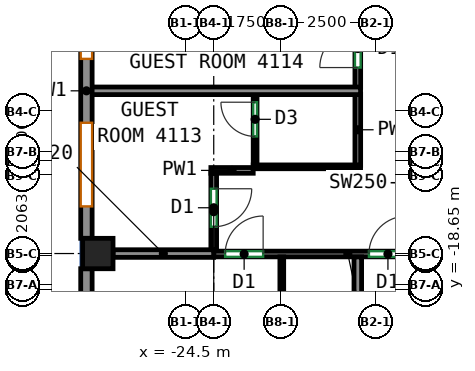
"""IFC4 building model, lengths in metres.
Left out: names, types, materials, properties, quantities, classifications, styles, units other than length and angle.
Written with IfcOpenShell. Run it as: python <this file> out.ifc"""

import sys

from ifc_helpers import new_model, si_unit, direction, frame, frame_2d, origin, origin_2d, place, context, subcontext, project, spatial, rectangle, extrude, source, transform, mapped, element, fill, save


model = new_model("IFC4")
c1 = context("Model", 3, precision=1e-05, world=origin(), true_north=direction((0.0, 1.0)))
c2 = subcontext(c1, "Body", "Model", "MODEL_VIEW")
j1 = project(units=[si_unit("LENGTHUNIT", "METRE"), si_unit("PLANEANGLEUNIT", "RADIAN")], contexts=[c1])
p1 = place(None, origin())
s1 = spatial("IfcSite", under=j1, at=p1, CompositionType="ELEMENT")
p2 = place(p1, origin())
s2 = spatial("IfcBuilding", under=s1, at=p2, CompositionType="ELEMENT")
p3 = place(p2, frame((0.0, 0.0, 175.3)))
s3 = spatial("IfcBuildingStorey", under=s2, at=p3, CompositionType="ELEMENT", Elevation=175.3)
m1 = source(origin(), c2, "Body", "SweptSolid", [
    extrude(rectangle(XDim=0.8, YDim=0.8, at=origin_2d()), origin(), (0.0, 0.0, 1.0), 3.12),
])
p4 = place(p3, frame((-26.8, -17.688, 0.0), z_axis=(0.0, 0.0, 1.0), x_axis=(1.0, 0.0, 0.0)))
e1 = element("IfcColumn", 1, at=p4, inside=s3, PredefinedType="COLUMN", context=c2, shape_type="MappedRepresentation", body=[
    mapped(m1, transform((0.0, 0.0, 0.0))),
])
m2 = source(origin(), c2, "Body", "SweptSolid", [
    extrude(rectangle(XDim=7.763, YDim=0.3, at=frame_2d((3.881, 0.0))), origin(), (0.0, 0.0, 1.0), 3.12),
])
p5 = place(p3, frame((-27.1, -9.525, 0.0), z_axis=(0.0, 0.0, 1.0), x_axis=(0.0, -1.0, 0.0)))
e2 = element("IfcWall", 2, at=p5, inside=s3, PredefinedType="SOLIDWALL", context=c2, shape_type="MappedRepresentation", body=[
    mapped(m2, transform((0.0, 0.0, 0.0))),
])
p6 = place(p5, frame((0.841, 0.0, 0.85)))
e3 = element("IfcOpeningElement", 3, at=p6, cuts=e2, PredefinedType="OPENING", context=c2, shape_type="SweptSolid", body=[
    extrude(rectangle(XDim=2.2, YDim=1.95, at=frame_2d((1.1, 0.975))), frame((0.0, 0.16, 0.0), z_axis=(0.0, -1.0, 0.0), x_axis=(1.0, 0.0, 0.0)), (0.0, 0.0, 1.0), 0.32),
])
p7 = place(p5, frame((4.722, 0.0, 0.85)))
e4 = element("IfcOpeningElement", 4, at=p7, cuts=e2, PredefinedType="OPENING", context=c2, shape_type="SweptSolid", body=[
    extrude(rectangle(XDim=2.2, YDim=1.95, at=frame_2d((1.1, 0.975))), frame((0.0, 0.16, 0.0), z_axis=(0.0, -1.0, 0.0), x_axis=(1.0, 0.0, 0.0)), (0.0, 0.0, 1.0), 0.32),
])
m3 = source(origin(), c2, "Body", "SweptSolid", [
    extrude(rectangle(XDim=4.263, YDim=0.3, at=frame_2d((2.131, 0.0))), origin(), (0.0, 0.0, 1.0), 3.12),
])
p8 = place(p3, frame((-27.1, -18.087, 0.0), z_axis=(0.0, 0.0, 1.0), x_axis=(0.0, -1.0, 0.0)))
e5 = element("IfcWall", 5, at=p8, inside=s3, PredefinedType="SOLIDWALL", context=c2, shape_type="MappedRepresentation", body=[
    mapped(m3, transform((0.0, 0.0, 0.0))),
])
p9 = place(p8, frame((1.031, 0.0, 0.85)))
e6 = element("IfcOpeningElement", 6, at=p9, cuts=e5, PredefinedType="OPENING", context=c2, shape_type="SweptSolid", body=[
    extrude(rectangle(XDim=2.2, YDim=1.95, at=frame_2d((1.1, 0.975))), frame((0.0, 0.16, 0.0), z_axis=(0.0, -1.0, 0.0), x_axis=(1.0, 0.0, 0.0)), (0.0, 0.0, 1.0), 0.32),
])
p10 = place(p3, frame((-23.75, -17.7, 0.0), z_axis=(0.0, 0.0, 1.0), x_axis=(1.0, 0.0, 0.0)))
e7 = element("IfcWall", 7, at=p10, inside=s3, PredefinedType="PARTITIONING", context=c2, shape_type="SweptSolid", body=[
    extrude(rectangle(XDim=7.058, YDim=0.15, at=frame_2d((3.529, 0.0))), origin(), (0.0, 0.0, 1.0), 2.52),
])
p11 = place(p10, frame((0.3, 0.0, 0.0)))
e8 = element("IfcOpeningElement", 8, at=p11, cuts=e7, PredefinedType="OPENING", context=c2, shape_type="SweptSolid", body=[
    extrude(rectangle(XDim=1.0, YDim=2.1, at=frame_2d((0.5, 1.05))), frame((0.0, 0.085, 0.0), z_axis=(0.0, -1.0, 0.0), x_axis=(1.0, 0.0, 0.0)), (0.0, 0.0, 1.0), 0.17),
])
p12 = place(p10, frame((4.084, 0.0, 0.0)))
e9 = element("IfcOpeningElement", 9, at=p12, cuts=e7, PredefinedType="OPENING", context=c2, shape_type="SweptSolid", body=[
    extrude(rectangle(XDim=1.0, YDim=2.1, at=frame_2d((0.5, 1.05))), frame((0.0, 0.085, 0.0), z_axis=(0.0, -1.0, 0.0), x_axis=(1.0, 0.0, 0.0)), (0.0, 0.0, 1.0), 0.17),
])
p13 = place(p3, frame((-23.75, -15.575, 0.0), z_axis=(0.0, 0.0, 1.0), x_axis=(0.0, -1.0, 0.0)))
e10 = element("IfcWall", 10, at=p13, inside=s3, PredefinedType="PARTITIONING", context=c2, shape_type="SweptSolid", body=[
    extrude(rectangle(XDim=2.023, YDim=0.15, at=frame_2d((1.011, 0.0))), origin(), (0.0, 0.0, 1.0), 2.52),
])
p14 = place(p13, frame((0.408, 0.0, 0.0)))
e11 = element("IfcOpeningElement", 11, at=p14, cuts=e10, PredefinedType="OPENING", context=c2, shape_type="SweptSolid", body=[
    extrude(rectangle(XDim=1.0, YDim=2.1, at=frame_2d((0.5, 1.05))), frame((0.0, 0.085, 0.0), z_axis=(0.0, -1.0, 0.0), x_axis=(1.0, 0.0, 0.0)), (0.0, 0.0, 1.0), 0.17),
])
p15 = place(p3, frame((-23.825, -15.5, 0.0), z_axis=(0.0, 0.0, 1.0), x_axis=(1.0, 0.0, 0.0)))
e12 = element("IfcWall", 12, at=p15, inside=s3, PredefinedType="PARTITIONING", context=c2, shape_type="SweptSolid", body=[
    extrude(rectangle(XDim=1.114, YDim=0.15, at=frame_2d((0.557, 0.0))), origin(), (0.0, 0.0, 1.0), 3.12),
])
p16 = place(p3, frame((-19.959, -15.366, 0.0), z_axis=(0.0, 0.0, 1.0), x_axis=(0.0, 1.0, 0.0)))
e13 = element("IfcWall", 13, at=p16, inside=s3, PredefinedType="PARTITIONING", context=c2, shape_type="SweptSolid", body=[
    extrude(rectangle(XDim=1.87, YDim=0.15, at=frame_2d((0.935, 0.0))), origin(), (0.0, 0.0, 1.0), 3.12),
])
p17 = place(p3, frame((-19.959, -13.316, 0.0), z_axis=(0.0, 0.0, 1.0), x_axis=(0.0, 1.0, 0.0)))
e14 = element("IfcWall", 14, at=p17, inside=s3, PredefinedType="PARTITIONING", context=c2, shape_type="SweptSolid", body=[
    extrude(rectangle(XDim=2.151, YDim=0.15, at=frame_2d((1.075, 0.0))), origin(), (0.0, 0.0, 1.0), 3.12),
])
p18 = place(p17, frame((0.522, 0.0, 0.0)))
e15 = element("IfcOpeningElement", 15, at=p18, cuts=e14, PredefinedType="OPENING", context=c2, shape_type="SweptSolid", body=[
    extrude(rectangle(XDim=1.0, YDim=2.1, at=frame_2d((0.5, 1.05))), frame((0.0, 0.085, 0.0), z_axis=(0.0, -1.0, 0.0), x_axis=(1.0, 0.0, 0.0)), (0.0, 0.0, 1.0), 0.17),
])
p19 = place(p3, frame((-21.959, -20.338, 0.0), z_axis=(0.0, 0.0, 1.0), x_axis=(0.0, 1.0, 0.0)))
e16 = element("IfcWall", 16, at=p19, inside=s3, PredefinedType="PARTITIONING", context=c2, shape_type="SweptSolid", body=[
    extrude(rectangle(XDim=2.561, YDim=0.1, at=frame_2d((1.28, 0.0))), origin(), (0.0, 0.0, 1.0), 3.12),
])
p20 = place(p19, frame((0.41, 0.0, 0.0)))
e17 = element("IfcOpeningElement", 17, at=p20, cuts=e16, PredefinedType="OPENING", context=c2, shape_type="SweptSolid", body=[
    extrude(rectangle(XDim=0.9, YDim=2.1, at=frame_2d((0.45, 1.05))), frame((0.0, 0.06, 0.0), z_axis=(0.0, -1.0, 0.0), x_axis=(1.0, 0.0, 0.0)), (0.0, 0.0, 1.0), 0.12),
])
p21 = place(p3, frame((-26.4, -17.688, 0.0), z_axis=(0.0, 0.0, 1.0), x_axis=(1.0, 0.0, 0.0)))
e18 = element("IfcWall", 18, at=p21, inside=s3, PredefinedType="PARTITIONING", context=c2, shape_type="SweptSolid", body=[
    extrude(rectangle(XDim=2.648, YDim=0.2, at=frame_2d((1.324, 0.0))), origin(), (0.0, 0.0, 1.0), 2.52),
])
p22 = place(p3, frame((-19.959, -20.338, 0.0), z_axis=(0.0, 0.0, 1.0), x_axis=(0.0, 1.0, 0.0)))
e19 = element("IfcWall", 19, at=p22, inside=s3, PredefinedType="PARTITIONING", context=c2, shape_type="SweptSolid", body=[
    extrude(rectangle(XDim=2.561, YDim=0.2, at=frame_2d((1.28, 0.0))), origin(), (0.0, 0.0, 1.0), 3.12),
])
p23 = place(p3, frame((-19.886, -15.406, 0.0), z_axis=(0.0, 0.0, 1.0), x_axis=(-1.0, 0.0, 0.0)))
e20 = element("IfcWall", 20, at=p23, inside=s3, PredefinedType="PARTITIONING", context=c2, shape_type="SweptSolid", body=[
    extrude(rectangle(XDim=2.825, YDim=0.1, at=frame_2d((1.413, 0.0))), origin(), (0.0, 0.0, 1.0), 3.12),
])
p24 = place(p3, frame((-22.661, -15.356, 0.0), z_axis=(0.0, 0.0, 1.0), x_axis=(0.0, 1.0, 0.0)))
e21 = element("IfcWall", 21, at=p24, inside=s3, PredefinedType="PARTITIONING", context=c2, shape_type="SweptSolid", body=[
    extrude(rectangle(XDim=1.85, YDim=0.1, at=frame_2d((0.925, 0.0))), origin(), (0.0, 0.0, 1.0), 3.12),
])
p25 = place(p24, frame((0.75, 0.0, 0.0)))
e22 = element("IfcOpeningElement", 22, at=p25, cuts=e21, PredefinedType="OPENING", context=c2, shape_type="SweptSolid", body=[
    extrude(rectangle(XDim=0.9, YDim=2.1, at=frame_2d((0.45, 1.05))), frame((0.0, 0.06, 0.0), z_axis=(0.0, -1.0, 0.0), x_axis=(1.0, 0.0, 0.0)), (0.0, 0.0, 1.0), 0.12),
])
p26 = place(p3, frame((-27.0, -13.406, 0.0), z_axis=(0.0, 0.0, 1.0), x_axis=(1.0, 0.0, 0.0)))
e23 = element("IfcWall", 23, at=p26, inside=s3, PredefinedType="PARTITIONING", context=c2, shape_type="SweptSolid", body=[
    extrude(rectangle(XDim=7.114, YDim=0.2, at=frame_2d((3.557, 0.0))), origin(), (0.0, 0.0, 1.0), 3.12),
])
p27 = place(p6, origin())
e24 = element("IfcWindow", 24, at=p27, inside=s3, PartitioningType="SINGLE_PANEL", PredefinedType="WINDOW", context=c2, shape_type="SweptSolid", body=[
    extrude(rectangle(XDim=2.2, YDim=1.95, at=frame_2d((1.1, 0.975))), frame((0.0, 0.03, 0.0), z_axis=(0.0, -1.0, 0.0), x_axis=(1.0, 0.0, 0.0)), (0.0, 0.0, 1.0), 0.06),
])
fill(e3, e24)
p28 = place(p7, origin())
e25 = element("IfcWindow", 25, at=p28, inside=s3, PartitioningType="SINGLE_PANEL", PredefinedType="WINDOW", context=c2, shape_type="SweptSolid", body=[
    extrude(rectangle(XDim=2.2, YDim=1.95, at=frame_2d((1.1, 0.975))), frame((0.0, 0.03, 0.0), z_axis=(0.0, -1.0, 0.0), x_axis=(1.0, 0.0, 0.0)), (0.0, 0.0, 1.0), 0.06),
])
fill(e4, e25)
p29 = place(p11, origin())
e26 = element("IfcDoor", 26, at=p29, inside=s3, OperationType="SINGLE_SWING_RIGHT", PredefinedType="DOOR", context=c2, shape_type="SweptSolid", body=[
    extrude(rectangle(XDim=1.0, YDim=2.1, at=frame_2d((0.5, 1.05))), frame((0.0, 0.025, 0.0), z_axis=(0.0, -1.0, 0.0), x_axis=(1.0, 0.0, 0.0)), (0.0, 0.0, 1.0), 0.05),
])
fill(e8, e26)
p30 = place(p12, origin())
e27 = element("IfcDoor", 27, at=p30, inside=s3, OperationType="SINGLE_SWING_RIGHT", PredefinedType="DOOR", context=c2, shape_type="SweptSolid", body=[
    extrude(rectangle(XDim=1.0, YDim=2.1, at=frame_2d((0.5, 1.05))), frame((0.0, 0.025, 0.0), z_axis=(0.0, -1.0, 0.0), x_axis=(1.0, 0.0, 0.0)), (0.0, 0.0, 1.0), 0.05),
])
fill(e9, e27)
p31 = place(p14, origin())
e28 = element("IfcDoor", 28, at=p31, inside=s3, OperationType="SINGLE_SWING_LEFT", PredefinedType="DOOR", context=c2, shape_type="SweptSolid", body=[
    extrude(rectangle(XDim=1.0, YDim=2.1, at=frame_2d((0.5, 1.05))), frame((0.0, 0.025, 0.0), z_axis=(0.0, -1.0, 0.0), x_axis=(1.0, 0.0, 0.0)), (0.0, 0.0, 1.0), 0.05),
])
fill(e11, e28)
p32 = place(p25, origin())
e29 = element("IfcDoor", 29, at=p32, inside=s3, OperationType="SINGLE_SWING_RIGHT", PredefinedType="DOOR", context=c2, shape_type="SweptSolid", body=[
    extrude(rectangle(XDim=0.9, YDim=2.1, at=frame_2d((0.45, 1.05))), frame((0.0, 0.025, 0.0), z_axis=(0.0, -1.0, 0.0), x_axis=(1.0, 0.0, 0.0)), (0.0, 0.0, 1.0), 0.05),
])
fill(e22, e29)
p33 = place(p18, origin())
e30 = element("IfcDoor", 30, at=p33, inside=s3, OperationType="SINGLE_SWING_LEFT", PredefinedType="DOOR", context=c2, shape_type="SweptSolid", body=[
    extrude(rectangle(XDim=1.0, YDim=2.1, at=frame_2d((0.5, 1.05))), frame((0.0, 0.025, 0.0), z_axis=(0.0, -1.0, 0.0), x_axis=(1.0, 0.0, 0.0)), (0.0, 0.0, 1.0), 0.05),
])
fill(e15, e30)
save(model, sys.argv[1])
